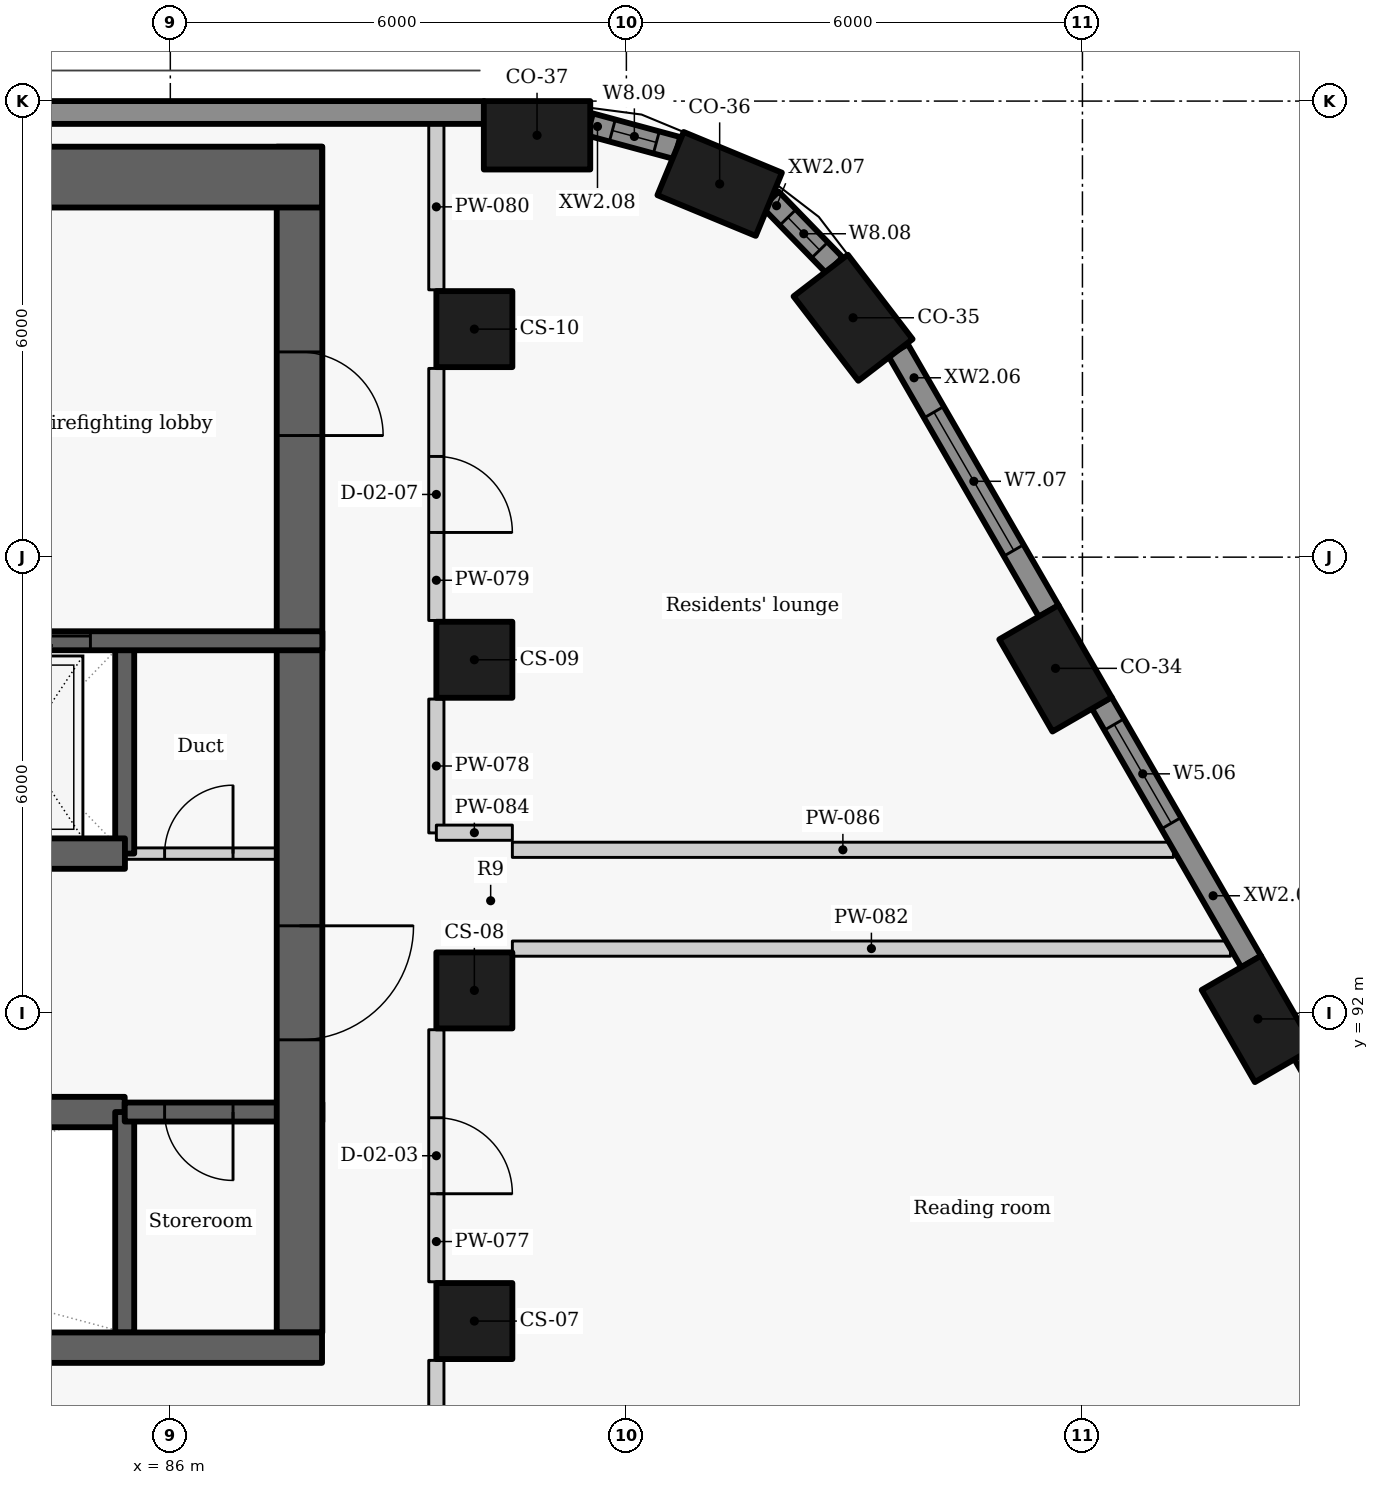
"""IFC4 building model, lengths in metres.
Left out: names, types, materials, properties, quantities, classifications, styles, units other than length and angle.
Written with IfcOpenShell. Run it as: python <this file> out.ifc"""

import sys

from ifc_helpers import new_model, si_unit, direction, frame, frame_2d, origin, origin_2d, place, context, subcontext, project, spatial, rectangle, extrude, element, fill, save


model = new_model("IFC4")
c1 = context("Model", 3, precision=1e-05, world=origin(), true_north=direction((0.0, 1.0)))
c2 = subcontext(c1, "Body", "Model", "MODEL_VIEW")
j1 = project(units=[si_unit("LENGTHUNIT", "METRE"), si_unit("PLANEANGLEUNIT", "RADIAN")], contexts=[c1])
p1 = place(None, origin())
s1 = spatial("IfcSite", under=j1, at=p1, CompositionType="ELEMENT")
p2 = place(p1, origin())
s2 = spatial("IfcBuilding", under=s1, at=p2, CompositionType="ELEMENT")
p3 = place(p2, frame((0.0, 0.0, 87.6)))
s3 = spatial("IfcBuildingStorey", under=s2, at=p3, CompositionType="ELEMENT", Elevation=87.6)
for number, where, z_axis, x_axis in (
    (1, (100.308, 91.925, 0.0), (0.0, 0.0, 1.0), (-0.5, 0.866, 0.0)),
    (2, (97.646, 96.537, 0.0), (0.0, 0.0, 1.0), (-0.5, 0.866, 0.0)),
    (3, (94.982, 101.149, 0.0), (0.0, 0.0, 1.0), (-0.609, 0.793, 0.0)),
    (4, (93.227, 102.91, 0.0), (0.0, 0.0, 1.0), (-0.924, 0.383, 0.0)),
    (5, (90.825, 103.55, 0.0), (0.0, 0.0, 1.0), (-1.0, 0.0, 0.0)),
):
    element("IfcColumn", number, at=place(p3, frame(where, z_axis=z_axis, x_axis=x_axis)), inside=s3, PredefinedType="COLUMN", context=c2, shape_type="SweptSolid", body=[
        extrude(rectangle(XDim=1.4, YDim=0.9, at=origin_2d()), origin(), (0.0, 0.0, 1.0), 3.3),
    ])
for number, where, z_axis, x_axis in (
    (6, (90.0, 87.95, 0.0), (0.0, 0.0, 1.0), (0.0, 1.0, 0.0)),
    (7, (90.0, 92.3, 0.0), (0.0, 0.0, 1.0), (0.0, 1.0, 0.0)),
    (8, (90.0, 96.65, 0.0), (0.0, 0.0, 1.0), (0.0, 1.0, 0.0)),
    (9, (90.0, 101.0, 0.0), (0.0, 0.0, 1.0), (0.0, 1.0, 0.0)),
):
    element("IfcColumn", number, at=place(p3, frame(where, z_axis=z_axis, x_axis=x_axis)), inside=s3, PredefinedType="COLUMN", context=c2, shape_type="SweptSolid", body=[
        extrude(rectangle(XDim=1.0, YDim=1.0, at=origin_2d()), origin(), (0.0, 0.0, 1.0), 3.3),
    ])
p4 = place(p3, frame((102.735, 88.323, 0.0), z_axis=(0.0, 0.0, 1.0), x_axis=(-0.500009139881, 0.866020126807, 0.0)))
e10 = element("IfcWall", 10, at=p4, inside=s3, PredefinedType="SOLIDWALL", context=c2, shape_type="SweptSolid", body=[
    extrude(rectangle(XDim=3.637, YDim=0.3, at=frame_2d((1.818, 0.0))), origin(), (0.0, 0.0, 1.0), 2.425),
])
p5 = place(p4, frame((0.768, 0.0, 0.9)))
e11 = element("IfcOpeningElement", 11, at=p5, cuts=e10, PredefinedType="OPENING", context=c2, shape_type="SweptSolid", body=[
    extrude(rectangle(XDim=2.1, YDim=1.1, at=frame_2d((1.05, 0.55))), frame((0.0, 0.16, 0.0), z_axis=(0.0, -1.0, 0.0), x_axis=(1.0, 0.0, 0.0)), (0.0, 0.0, 1.0), 0.32),
])
p6 = place(p3, frame((100.22, 92.677, 0.0), z_axis=(0.0, 0.0, 1.0), x_axis=(-0.499957037901, 0.866050206543, 0.0)))
e12 = element("IfcWall", 12, at=p6, inside=s3, PredefinedType="SOLIDWALL", context=c2, shape_type="SweptSolid", body=[
    extrude(rectangle(XDim=3.934, YDim=0.3, at=frame_2d((1.967, 0.0))), origin(), (0.0, 0.0, 1.0), 2.425),
])
p7 = place(p6, frame((2.104, 0.0, 0.9)))
e13 = element("IfcOpeningElement", 13, at=p7, cuts=e12, PredefinedType="OPENING", context=c2, shape_type="SweptSolid", body=[
    extrude(rectangle(XDim=1.5, YDim=1.1, at=frame_2d((0.75, 0.55))), frame((0.0, 0.16, 0.0), z_axis=(0.0, -1.0, 0.0), x_axis=(1.0, 0.0, 0.0)), (0.0, 0.0, 1.0), 0.32),
])
p8 = place(p3, frame((97.557, 97.29, 0.0), z_axis=(0.0, 0.0, 1.0), x_axis=(-0.500043828347, 0.866000097998, 0.0)))
e14 = element("IfcWall", 14, at=p8, inside=s3, PredefinedType="SOLIDWALL", context=c2, shape_type="SweptSolid", body=[
    extrude(rectangle(XDim=3.968, YDim=0.3, at=frame_2d((1.984, 0.0))), origin(), (0.0, 0.0, 1.0), 2.425),
])
p9 = place(p8, frame((0.922, 0.0, 0.9)))
e15 = element("IfcOpeningElement", 15, at=p9, cuts=e14, PredefinedType="OPENING", context=c2, shape_type="SweptSolid", body=[
    extrude(rectangle(XDim=2.1, YDim=1.1, at=frame_2d((1.05, 0.55))), frame((0.0, 0.16, 0.0), z_axis=(0.0, -1.0, 0.0), x_axis=(1.0, 0.0, 0.0)), (0.0, 0.0, 1.0), 0.32),
])
p10 = place(p3, frame((94.738, 101.839, 0.0), z_axis=(0.0, 0.0, 1.0), x_axis=(-0.697032216592, 0.717039809936, 0.0)))
e16 = element("IfcWall", 16, at=p10, inside=s3, PredefinedType="SOLIDWALL", context=c2, shape_type="SweptSolid", body=[
    extrude(rectangle(XDim=1.208, YDim=0.3, at=frame_2d((0.604, 0.0))), origin(), (0.0, 0.0, 1.0), 2.425),
])
p11 = place(p10, frame((0.279, 0.0, 0.9)))
e17 = element("IfcOpeningElement", 17, at=p11, cuts=e16, PredefinedType="OPENING", context=c2, shape_type="SweptSolid", body=[
    extrude(rectangle(XDim=0.6, YDim=1.1, at=frame_2d((0.3, 0.55))), frame((0.0, 0.16, 0.0), z_axis=(0.0, -1.0, 0.0), x_axis=(1.0, 0.0, 0.0)), (0.0, 0.0, 1.0), 0.32),
])
p12 = place(p3, frame((92.669, 103.382, 0.0), z_axis=(0.0, 0.0, 1.0), x_axis=(-0.965278131029, 0.261224290136, 0.0)))
e18 = element("IfcWall", 18, at=p12, inside=s3, PredefinedType="SOLIDWALL", context=c2, shape_type="SweptSolid", body=[
    extrude(rectangle(XDim=1.19, YDim=0.3, at=frame_2d((0.595, 0.0))), origin(), (0.0, 0.0, 1.0), 2.425),
])
p13 = place(p12, frame((0.285, 0.0, 0.9)))
e19 = element("IfcOpeningElement", 19, at=p13, cuts=e18, PredefinedType="OPENING", context=c2, shape_type="SweptSolid", body=[
    extrude(rectangle(XDim=0.6, YDim=1.1, at=frame_2d((0.3, 0.55))), frame((0.0, 0.16, 0.0), z_axis=(0.0, -1.0, 0.0), x_axis=(1.0, 0.0, 0.0)), (0.0, 0.0, 1.0), 0.32),
])
p14 = place(p3, frame((90.129, 103.85, 0.0), z_axis=(0.0, 0.0, 1.0), x_axis=(-1.0, 0.0, 0.0)))
e20 = element("IfcWall", 20, at=p14, inside=s3, PredefinedType="SOLIDWALL", context=c2, shape_type="SweptSolid", body=[
    extrude(rectangle(XDim=20.291, YDim=0.3, at=frame_2d((10.146, 0.0))), origin(), (0.0, 0.0, 1.0), 2.425),
])
p15 = place(p3, frame((74.6, 90.7, -0.275), z_axis=(0.0, 0.0, 1.0), x_axis=(1.0, 0.0, 0.0)))
e21 = element("IfcWall", 21, at=p15, inside=s3, PredefinedType="SHEAR", context=c2, shape_type="SweptSolid", body=[
    extrude(rectangle(XDim=10.8, YDim=0.4, at=frame_2d((5.4, 0.0))), origin(), (0.0, 0.0, 1.0), 3.3),
])
p16 = place(p15, frame((0.8, 0.0, 0.275)))
e22 = element("IfcOpeningElement", 22, at=p16, cuts=e21, PredefinedType="OPENING", context=c2, shape_type="SweptSolid", body=[
    extrude(rectangle(XDim=1.1, YDim=2.1, at=frame_2d((0.55, 1.05))), frame((0.0, 0.21, 0.0), z_axis=(0.0, -1.0, 0.0), x_axis=(1.0, 0.0, 0.0)), (0.0, 0.0, 1.0), 0.42),
])
p17 = place(p15, frame((3.5, 0.0, 0.275)))
e23 = element("IfcOpeningElement", 23, at=p17, cuts=e21, PredefinedType="OPENING", context=c2, shape_type="SweptSolid", body=[
    extrude(rectangle(XDim=1.1, YDim=2.1, at=frame_2d((0.55, 1.05))), frame((0.0, 0.21, 0.0), z_axis=(0.0, -1.0, 0.0), x_axis=(1.0, 0.0, 0.0)), (0.0, 0.0, 1.0), 0.42),
])
p18 = place(p15, frame((6.2, 0.0, 0.275)))
e24 = element("IfcOpeningElement", 24, at=p18, cuts=e21, PredefinedType="OPENING", context=c2, shape_type="SweptSolid", body=[
    extrude(rectangle(XDim=1.1, YDim=2.1, at=frame_2d((0.55, 1.05))), frame((0.0, 0.21, 0.0), z_axis=(0.0, -1.0, 0.0), x_axis=(1.0, 0.0, 0.0)), (0.0, 0.0, 1.0), 0.42),
])
p19 = place(p3, frame((85.4, 87.8, -0.275), z_axis=(0.0, 0.0, 1.0), x_axis=(0.0, 1.0, 0.0)))
e25 = element("IfcWall", 25, at=p19, inside=s3, PredefinedType="SHEAR", context=c2, shape_type="SweptSolid", body=[
    extrude(rectangle(XDim=2.9, YDim=0.25, at=frame_2d((1.45, 0.0))), origin(), (0.0, 0.0, 1.0), 3.3),
])
p20 = place(p3, frame((85.4, 94.1, -0.275), z_axis=(0.0, 0.0, 1.0), x_axis=(0.0, 1.0, 0.0)))
e26 = element("IfcWall", 26, at=p20, inside=s3, PredefinedType="SHEAR", context=c2, shape_type="SweptSolid", body=[
    extrude(rectangle(XDim=2.8, YDim=0.25, at=frame_2d((1.4, 0.0))), origin(), (0.0, 0.0, 1.0), 3.3),
])
p21 = place(p3, frame((88.0, 90.7, -0.275), z_axis=(0.0, 0.0, 1.0), x_axis=(-1.0, 0.0, 0.0)))
e27 = element("IfcWall", 27, at=p21, inside=s3, PredefinedType="SHEAR", context=c2, shape_type="SweptSolid", body=[
    extrude(rectangle(XDim=2.6, YDim=0.25, at=frame_2d((1.3, 0.0))), origin(), (0.0, 0.0, 1.0), 3.3),
])
p22 = place(p21, frame((1.175, 0.0, 0.275)))
e28 = element("IfcOpeningElement", 28, at=p22, cuts=e27, PredefinedType="OPENING", context=c2, shape_type="SweptSolid", body=[
    extrude(rectangle(XDim=0.9, YDim=2.1, at=frame_2d((0.45, 1.05))), frame((0.0, 0.135, 0.0), z_axis=(0.0, -1.0, 0.0), x_axis=(1.0, 0.0, 0.0)), (0.0, 0.0, 1.0), 0.27),
])
p23 = place(p3, frame((87.7, 103.4, -0.275), z_axis=(0.0, 0.0, 1.0), x_axis=(0.0, -1.0, 0.0)))
e29 = element("IfcWall", 29, at=p23, inside=s3, PredefinedType="SHEAR", context=c2, shape_type="SweptSolid", body=[
    extrude(rectangle(XDim=15.6, YDim=0.6, at=frame_2d((7.8, 0.0))), origin(), (0.0, 0.0, 1.0), 3.3),
])
p24 = place(p23, frame((10.25, 0.0, 0.275)))
e30 = element("IfcOpeningElement", 30, at=p24, cuts=e29, PredefinedType="OPENING", context=c2, shape_type="SweptSolid", body=[
    extrude(rectangle(XDim=1.5, YDim=2.1, at=frame_2d((0.75, 1.05))), frame((0.0, 0.31, 0.0), z_axis=(0.0, -1.0, 0.0), x_axis=(1.0, 0.0, 0.0)), (0.0, 0.0, 1.0), 0.62),
])
p25 = place(p23, frame((2.7, 0.0, 0.275)))
e31 = element("IfcOpeningElement", 31, at=p25, cuts=e29, PredefinedType="OPENING", context=c2, shape_type="SweptSolid", body=[
    extrude(rectangle(XDim=1.1, YDim=2.1, at=frame_2d((0.55, 1.05))), frame((0.0, 0.31, 0.0), z_axis=(0.0, -1.0, 0.0), x_axis=(1.0, 0.0, 0.0)), (0.0, 0.0, 1.0), 0.62),
])
p26 = place(p3, frame((85.397, 94.1, 0.0), z_axis=(0.0, 0.0, 1.0), x_axis=(1.0, 0.0, 0.0)))
e32 = element("IfcWall", 32, at=p26, inside=s3, PredefinedType="PARTITIONING", context=c2, shape_type="SweptSolid", body=[
    extrude(rectangle(XDim=2.603, YDim=0.15, at=frame_2d((1.302, 0.0))), origin(), (0.0, 0.0, 1.0), 3.025),
])
p27 = place(p26, frame((0.528, 0.0, 0.0)))
e33 = element("IfcOpeningElement", 33, at=p27, cuts=e32, PredefinedType="OPENING", context=c2, shape_type="SweptSolid", body=[
    extrude(rectangle(XDim=0.9, YDim=2.1, at=frame_2d((0.45, 1.05))), frame((0.0, 0.085, 0.0), z_axis=(0.0, -1.0, 0.0), x_axis=(1.0, 0.0, 0.0)), (0.0, 0.0, 1.0), 0.17),
])
p28 = place(p3, frame((82.697, 94.1, -0.275), z_axis=(0.0, 0.0, 1.0), x_axis=(1.0, 0.0, 0.0)))
e34 = element("IfcWall", 34, at=p28, inside=s3, PredefinedType="SHEAR", context=c2, shape_type="SweptSolid", body=[
    extrude(rectangle(XDim=2.706, YDim=0.4, at=frame_2d((1.353, 0.0))), origin(), (0.0, 0.0, 1.0), 3.3),
])
p29 = place(p3, frame((80.0, 96.9, -0.275), z_axis=(0.0, 0.0, 1.0), x_axis=(1.0, 0.0, 0.0)))
e35 = element("IfcWall", 35, at=p29, inside=s3, PredefinedType="SHEAR", context=c2, shape_type="SweptSolid", body=[
    extrude(rectangle(XDim=8.0, YDim=0.25, at=frame_2d((4.0, 0.0))), origin(), (0.0, 0.0, 1.0), 3.3),
])
p30 = place(p29, frame((3.849, 0.0, 0.275)))
e36 = element("IfcOpeningElement", 36, at=p30, cuts=e35, PredefinedType="OPENING", context=c2, shape_type="SweptSolid", body=[
    extrude(rectangle(XDim=1.1, YDim=2.1, at=frame_2d((0.55, 1.05))), frame((0.0, 0.135, 0.0), z_axis=(0.0, -1.0, 0.0), x_axis=(1.0, 0.0, 0.0)), (0.0, 0.0, 1.0), 0.27),
])
p31 = place(p3, frame((89.5, 87.433, 0.0), z_axis=(0.0, 0.0, 1.0), x_axis=(0.0, -1.0, 0.0)))
e37 = element("IfcWall", 37, at=p31, inside=s3, PredefinedType="PARTITIONING", context=c2, shape_type="SweptSolid", body=[
    extrude(rectangle(XDim=4.266, YDim=0.2, at=frame_2d((2.133, 0.0))), origin(), (0.0, 0.0, 1.0), 3.025),
])
p32 = place(p31, frame((1.733, 0.0, 0.0)))
e38 = element("IfcOpeningElement", 38, at=p32, cuts=e37, PredefinedType="OPENING", context=c2, shape_type="SweptSolid", body=[
    extrude(rectangle(XDim=1.0, YDim=2.1, at=frame_2d((0.5, 1.05))), frame((0.0, 0.11, 0.0), z_axis=(0.0, -1.0, 0.0), x_axis=(1.0, 0.0, 0.0)), (0.0, 0.0, 1.0), 0.22),
])
p33 = place(p3, frame((89.5, 91.783, 0.0), z_axis=(0.0, 0.0, 1.0), x_axis=(0.0, -1.0, 0.0)))
e39 = element("IfcWall", 39, at=p33, inside=s3, PredefinedType="PARTITIONING", context=c2, shape_type="SweptSolid", body=[
    extrude(rectangle(XDim=3.316, YDim=0.2, at=frame_2d((1.658, 0.0))), origin(), (0.0, 0.0, 1.0), 3.025),
])
p34 = place(p33, frame((1.158, 0.0, 0.0)))
e40 = element("IfcOpeningElement", 40, at=p34, cuts=e39, PredefinedType="OPENING", context=c2, shape_type="SweptSolid", body=[
    extrude(rectangle(XDim=1.0, YDim=2.1, at=frame_2d((0.5, 1.05))), frame((0.0, 0.11, 0.0), z_axis=(0.0, -1.0, 0.0), x_axis=(1.0, 0.0, 0.0)), (0.0, 0.0, 1.0), 0.22),
])
p35 = place(p3, frame((89.5, 94.372, 0.0), z_axis=(0.0, 0.0, 1.0), x_axis=(0.0, 1.0, 0.0)))
e41 = element("IfcWall", 41, at=p35, inside=s3, PredefinedType="PARTITIONING", context=c2, shape_type="SweptSolid", body=[
    extrude(rectangle(XDim=1.761, YDim=0.2, at=frame_2d((0.88, 0.0))), origin(), (0.0, 0.0, 1.0), 3.025),
])
p36 = place(p3, frame((89.5, 100.483, 0.0), z_axis=(0.0, 0.0, 1.0), x_axis=(0.0, -1.0, 0.0)))
e42 = element("IfcWall", 42, at=p36, inside=s3, PredefinedType="PARTITIONING", context=c2, shape_type="SweptSolid", body=[
    extrude(rectangle(XDim=3.316, YDim=0.2, at=frame_2d((1.658, 0.0))), origin(), (0.0, 0.0, 1.0), 3.025),
])
p37 = place(p36, frame((1.158, 0.0, 0.0)))
e43 = element("IfcOpeningElement", 43, at=p37, cuts=e42, PredefinedType="OPENING", context=c2, shape_type="SweptSolid", body=[
    extrude(rectangle(XDim=1.0, YDim=2.1, at=frame_2d((0.5, 1.05))), frame((0.0, 0.11, 0.0), z_axis=(0.0, -1.0, 0.0), x_axis=(1.0, 0.0, 0.0)), (0.0, 0.0, 1.0), 0.22),
])
p38 = place(p3, frame((89.5, 101.517, 0.0), z_axis=(0.0, 0.0, 1.0), x_axis=(0.0, 1.0, 0.0)))
e44 = element("IfcWall", 44, at=p38, inside=s3, PredefinedType="PARTITIONING", context=c2, shape_type="SweptSolid", body=[
    extrude(rectangle(XDim=2.183, YDim=0.2, at=frame_2d((1.091, 0.0))), origin(), (0.0, 0.0, 1.0), 3.025),
])
p39 = place(p3, frame((90.5, 92.85, 0.0), z_axis=(0.0, 0.0, 1.0), x_axis=(1.0, 0.0, 0.0)))
e45 = element("IfcWall", 45, at=p39, inside=s3, PredefinedType="PARTITIONING", context=c2, shape_type="SweptSolid", body=[
    extrude(rectangle(XDim=9.448, YDim=0.2, at=frame_2d((4.724, 0.0))), origin(), (0.0, 0.0, 1.0), 2.405),
])
p40 = place(p3, frame((89.5, 94.375, 0.0), z_axis=(0.0, 0.0, 1.0), x_axis=(1.0, 0.0, 0.0)))
e46 = element("IfcWall", 46, at=p40, inside=s3, PredefinedType="PARTITIONING", context=c2, shape_type="SweptSolid", body=[
    extrude(rectangle(XDim=1.0, YDim=0.2, at=frame_2d((0.5, 0.0))), origin(), (0.0, 0.0, 1.0), 2.505),
])
p41 = place(p3, frame((90.5, 94.15, 0.0), z_axis=(0.0, 0.0, 1.0), x_axis=(1.0, 0.0, 0.0)))
e47 = element("IfcWall", 47, at=p41, inside=s3, PredefinedType="PARTITIONING", context=c2, shape_type="SweptSolid", body=[
    extrude(rectangle(XDim=8.697, YDim=0.2, at=frame_2d((4.349, 0.0))), origin(), (0.0, 0.0, 1.0), 2.405),
])
p42 = place(p3, frame((72.004, 87.6, -0.275), z_axis=(0.0, 0.0, 1.0), x_axis=(1.0, 0.0, 0.0)))
e48 = element("IfcWall", 48, at=p42, inside=s3, PredefinedType="SHEAR", context=c2, shape_type="SweptSolid", body=[
    extrude(rectangle(XDim=15.992, YDim=0.4, at=frame_2d((7.996, 0.0))), origin(), (0.0, 0.0, 1.0), 3.3),
])
p43 = place(p3, frame((72.004, 103.0, -0.275), z_axis=(0.0, 0.0, 1.0), x_axis=(1.0, 0.0, 0.0)))
e49 = element("IfcWall", 49, at=p43, inside=s3, PredefinedType="SHEAR", context=c2, shape_type="SweptSolid", body=[
    extrude(rectangle(XDim=15.992, YDim=0.8, at=frame_2d((7.996, 0.0))), origin(), (0.0, 0.0, 1.0), 3.3),
])
p44 = place(p7, origin())
e50 = element("IfcWindow", 50, at=p44, inside=s3, PartitioningType="SINGLE_PANEL", PredefinedType="WINDOW", context=c2, shape_type="SweptSolid", body=[
    extrude(rectangle(XDim=1.5, YDim=1.1, at=frame_2d((0.75, 0.55))), frame((0.0, 0.03, 0.0), z_axis=(0.0, -1.0, 0.0), x_axis=(1.0, 0.0, 0.0)), (0.0, 0.0, 1.0), 0.06),
])
fill(e13, e50)
p45 = place(p9, origin())
e51 = element("IfcWindow", 51, at=p45, inside=s3, PartitioningType="SINGLE_PANEL", PredefinedType="WINDOW", context=c2, shape_type="SweptSolid", body=[
    extrude(rectangle(XDim=2.1, YDim=1.1, at=frame_2d((1.05, 0.55))), frame((0.0, 0.03, 0.0), z_axis=(0.0, -1.0, 0.0), x_axis=(1.0, 0.0, 0.0)), (0.0, 0.0, 1.0), 0.06),
])
fill(e15, e51)
p46 = place(p11, origin())
e52 = element("IfcWindow", 52, at=p46, inside=s3, PartitioningType="SINGLE_PANEL", PredefinedType="WINDOW", context=c2, shape_type="SweptSolid", body=[
    extrude(rectangle(XDim=0.6, YDim=1.1, at=frame_2d((0.3, 0.55))), frame((0.0, 0.03, 0.0), z_axis=(0.0, -1.0, 0.0), x_axis=(1.0, 0.0, 0.0)), (0.0, 0.0, 1.0), 0.06),
])
fill(e17, e52)
p47 = place(p13, origin())
e53 = element("IfcWindow", 53, at=p47, inside=s3, PartitioningType="SINGLE_PANEL", PredefinedType="WINDOW", context=c2, shape_type="SweptSolid", body=[
    extrude(rectangle(XDim=0.6, YDim=1.1, at=frame_2d((0.3, 0.55))), frame((0.0, 0.03, 0.0), z_axis=(0.0, -1.0, 0.0), x_axis=(1.0, 0.0, 0.0)), (0.0, 0.0, 1.0), 0.06),
])
fill(e19, e53)
p48 = place(p22, origin())
e54 = element("IfcDoor", 54, at=p48, inside=s3, OperationType="SINGLE_SWING_LEFT", PredefinedType="DOOR", context=c2, shape_type="SweptSolid", body=[
    extrude(rectangle(XDim=0.9, YDim=2.1, at=frame_2d((0.45, 1.05))), frame((0.0, 0.025, 0.0), z_axis=(0.0, -1.0, 0.0), x_axis=(1.0, 0.0, 0.0)), (0.0, 0.0, 1.0), 0.05),
])
fill(e28, e54)
p49 = place(p30, origin())
e55 = element("IfcDoor", 55, at=p49, inside=s3, OperationType="SLIDING_TO_LEFT", PredefinedType="DOOR", context=c2, shape_type="SweptSolid", body=[
    extrude(rectangle(XDim=1.1, YDim=2.1, at=frame_2d((0.55, 1.05))), frame((0.0, 0.025, 0.0), z_axis=(0.0, -1.0, 0.0), x_axis=(1.0, 0.0, 0.0)), (0.0, 0.0, 1.0), 0.05),
])
fill(e36, e55)
p50 = place(p27, origin())
e56 = element("IfcDoor", 56, at=p50, inside=s3, OperationType="SINGLE_SWING_RIGHT", PredefinedType="DOOR", context=c2, shape_type="SweptSolid", body=[
    extrude(rectangle(XDim=0.9, YDim=2.1, at=frame_2d((0.45, 1.05))), frame((0.0, 0.025, 0.0), z_axis=(0.0, -1.0, 0.0), x_axis=(1.0, 0.0, 0.0)), (0.0, 0.0, 1.0), 0.05),
])
fill(e33, e56)
p51 = place(p34, origin())
e57 = element("IfcDoor", 57, at=p51, inside=s3, OperationType="SINGLE_SWING_RIGHT", PredefinedType="DOOR", context=c2, shape_type="SweptSolid", body=[
    extrude(rectangle(XDim=1.0, YDim=2.1, at=frame_2d((0.5, 1.05))), frame((0.0, 0.025, 0.0), z_axis=(0.0, -1.0, 0.0), x_axis=(1.0, 0.0, 0.0)), (0.0, 0.0, 1.0), 0.05),
])
fill(e40, e57)
p52 = place(p37, origin())
e58 = element("IfcDoor", 58, at=p52, inside=s3, OperationType="SINGLE_SWING_RIGHT", PredefinedType="DOOR", context=c2, shape_type="SweptSolid", body=[
    extrude(rectangle(XDim=1.0, YDim=2.1, at=frame_2d((0.5, 1.05))), frame((0.0, 0.025, 0.0), z_axis=(0.0, -1.0, 0.0), x_axis=(1.0, 0.0, 0.0)), (0.0, 0.0, 1.0), 0.05),
])
fill(e43, e58)
p53 = place(p24, origin())
e59 = element("IfcDoor", 59, at=p53, inside=s3, OperationType="DOUBLE_DOOR_SINGLE_SWING", PredefinedType="DOOR", context=c2, shape_type="SweptSolid", body=[
    extrude(rectangle(XDim=1.5, YDim=2.1, at=frame_2d((0.75, 1.05))), frame((0.0, 0.025, 0.0), z_axis=(0.0, -1.0, 0.0), x_axis=(1.0, 0.0, 0.0)), (0.0, 0.0, 1.0), 0.05),
])
fill(e30, e59)
p54 = place(p25, origin())
e60 = element("IfcDoor", 60, at=p54, inside=s3, OperationType="SINGLE_SWING_RIGHT", PredefinedType="DOOR", context=c2, shape_type="SweptSolid", body=[
    extrude(rectangle(XDim=1.1, YDim=2.1, at=frame_2d((0.55, 1.05))), frame((0.0, 0.025, 0.0), z_axis=(0.0, -1.0, 0.0), x_axis=(1.0, 0.0, 0.0)), (0.0, 0.0, 1.0), 0.05),
])
fill(e31, e60)
save(model, sys.argv[1])
